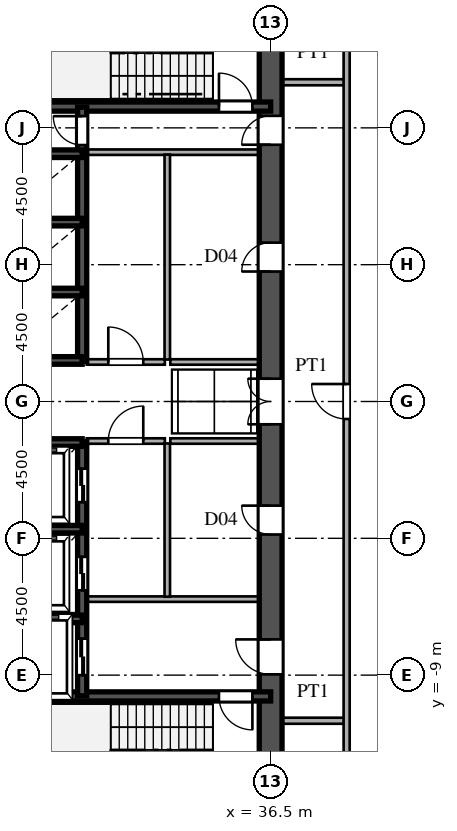
"""IFC4 building model, lengths in metres.
Left out: names, types, materials, properties, quantities, classifications, styles, units other than length and angle.
Written with IfcOpenShell. Run it as: python <this file> out.ifc"""

import sys

from ifc_helpers import new_model, si_unit, direction, frame, frame_2d, origin, place, context, subcontext, project, spatial, rectangle, extrude, source, transform, mapped, element, fill, save


model = new_model("IFC4")
c1 = context("Model", 3, precision=1e-05, world=origin(), true_north=direction((0.0, 1.0)))
c2 = subcontext(c1, "Body", "Model", "MODEL_VIEW")
j1 = project(units=[si_unit("LENGTHUNIT", "METRE"), si_unit("PLANEANGLEUNIT", "RADIAN")], contexts=[c1])
p1 = place(None, origin())
s1 = spatial("IfcSite", under=j1, at=p1, CompositionType="ELEMENT")
p2 = place(p1, origin())
s2 = spatial("IfcBuilding", under=s1, at=p2, CompositionType="ELEMENT")
p3 = place(p2, frame((0.0, 0.0, 14.4)))
s3 = spatial("IfcBuildingStorey", under=s2, at=p3, CompositionType="ELEMENT", Elevation=14.4)
p4 = place(p3, frame((30.537, -26.985, 0.0), z_axis=(0.0, 0.0, 1.0), x_axis=(0.926944846568, 0.375197616492, 0.0)))
e1 = element("IfcWall", 1, at=p4, inside=s3, PredefinedType="SOLIDWALL", context=c2, shape_type="SweptSolid", body=[
    extrude(rectangle(XDim=45.23, YDim=0.32, at=frame_2d((22.615, 0.0))), origin(), (0.0, 0.0, 1.0), 4.28),
])
p5 = place(p4, frame((6.0, 0.0, 0.85)))
e2 = element("IfcOpeningElement", 2, at=p5, cuts=e1, PredefinedType="OPENING", context=c2, shape_type="SweptSolid", body=[
    extrude(rectangle(XDim=1.8, YDim=2.0, at=frame_2d((0.9, 1.0))), frame((0.0, 0.17, 0.0), z_axis=(0.0, -1.0, 0.0), x_axis=(1.0, 0.0, 0.0)), (0.0, 0.0, 1.0), 0.34),
])
p6 = place(p4, frame((36.23, 0.0, 0.85)))
e3 = element("IfcOpeningElement", 3, at=p6, cuts=e1, PredefinedType="OPENING", context=c2, shape_type="SweptSolid", body=[
    extrude(rectangle(XDim=1.8, YDim=2.0, at=frame_2d((0.9, 1.0))), frame((0.0, 0.17, 0.0), z_axis=(0.0, -1.0, 0.0), x_axis=(1.0, 0.0, 0.0)), (0.0, 0.0, 1.0), 0.34),
])
p7 = place(p3, frame((72.463, 10.015, 0.0), z_axis=(0.0, 0.0, 1.0), x_axis=(-0.926944846568, 0.375197616492, 0.0)))
e4 = element("IfcWall", 4, at=p7, inside=s3, PredefinedType="SOLIDWALL", context=c2, shape_type="SweptSolid", body=[
    extrude(rectangle(XDim=45.23, YDim=0.32, at=frame_2d((22.615, 0.0))), origin(), (0.0, 0.0, 1.0), 4.28),
])
p8 = place(p7, frame((6.0, 0.0, 0.85)))
e5 = element("IfcOpeningElement", 5, at=p8, cuts=e4, PredefinedType="OPENING", context=c2, shape_type="SweptSolid", body=[
    extrude(rectangle(XDim=1.8, YDim=2.0, at=frame_2d((0.9, 1.0))), frame((0.0, 0.17, 0.0), z_axis=(0.0, -1.0, 0.0), x_axis=(1.0, 0.0, 0.0)), (0.0, 0.0, 1.0), 0.34),
])
p9 = place(p7, frame((36.23, 0.0, 0.85)))
e6 = element("IfcOpeningElement", 6, at=p9, cuts=e4, PredefinedType="OPENING", context=c2, shape_type="SweptSolid", body=[
    extrude(rectangle(XDim=1.8, YDim=2.0, at=frame_2d((0.9, 1.0))), frame((0.0, 0.17, 0.0), z_axis=(0.0, -1.0, 0.0), x_axis=(1.0, 0.0, 0.0)), (0.0, 0.0, 1.0), 0.34),
])
p10 = place(p3, frame((36.5, -13.65, 0.0), z_axis=(0.0, 0.0, 1.0), x_axis=(0.0, 1.0, 0.0)))
e7 = element("IfcWall", 7, at=p10, inside=s3, PredefinedType="SHEAR", context=c2, shape_type="SweptSolid", body=[
    extrude(rectangle(XDim=7.15, YDim=0.75, at=frame_2d((3.575, 0.0))), origin(), (0.0, 0.0, 1.0), 4.28),
])
p11 = place(p10, frame((4.675, 0.0, 0.0)))
e8 = element("IfcOpeningElement", 8, at=p11, cuts=e7, PredefinedType="OPENING", context=c2, shape_type="SweptSolid", body=[
    extrude(rectangle(XDim=1.15, YDim=2.2, at=frame_2d((0.575, 1.1))), frame((0.0, 0.385, 0.0), z_axis=(0.0, -1.0, 0.0), x_axis=(1.0, 0.0, 0.0)), (0.0, 0.0, 1.0), 0.77),
])
p12 = place(p3, frame((36.5, -1.3, 0.0), z_axis=(0.0, 0.0, 1.0), x_axis=(0.0, 1.0, 0.0)))
e9 = element("IfcWall", 9, at=p12, inside=s3, PredefinedType="SHEAR", context=c2, shape_type="SweptSolid", body=[
    extrude(rectangle(XDim=2.6, YDim=0.75, at=frame_2d((1.3, 0.0))), origin(), (0.0, 0.0, 1.0), 4.28),
])
p13 = place(p12, frame((0.55, 0.0, 0.0)))
e10 = element("IfcOpeningElement", 10, at=p13, cuts=e9, PredefinedType="OPENING", context=c2, shape_type="SweptSolid", body=[
    extrude(rectangle(XDim=1.5, YDim=2.3, at=frame_2d((0.75, 1.15))), frame((0.0, 0.385, 0.0), z_axis=(0.0, -1.0, 0.0), x_axis=(1.0, 0.0, 0.0)), (0.0, 0.0, 1.0), 0.77),
])
p14 = place(p3, frame((36.5, 8.2, 0.0), z_axis=(0.0, 0.0, 1.0), x_axis=(0.0, 1.0, 0.0)))
e11 = element("IfcWall", 11, at=p14, inside=s3, PredefinedType="SHEAR", context=c2, shape_type="SweptSolid", body=[
    extrude(rectangle(XDim=5.45, YDim=0.75, at=frame_2d((2.725, 0.0))), origin(), (0.0, 0.0, 1.0), 4.28),
])
p15 = place(p14, frame((0.245, 0.0, 0.0)))
e12 = element("IfcOpeningElement", 12, at=p15, cuts=e11, PredefinedType="OPENING", context=c2, shape_type="SweptSolid", body=[
    extrude(rectangle(XDim=0.95, YDim=2.15, at=frame_2d((0.475, 1.075))), frame((0.0, 0.385, 0.0), z_axis=(0.0, -1.0, 0.0), x_axis=(1.0, 0.0, 0.0)), (0.0, 0.0, 1.0), 0.77),
])
p16 = place(p3, frame((36.5, -6.5, 0.0), z_axis=(0.0, 0.0, 1.0), x_axis=(0.0, 1.0, 0.0)))
e13 = element("IfcWall", 13, at=p16, inside=s3, PredefinedType="SHEAR", context=c2, shape_type="SweptSolid", body=[
    extrude(rectangle(XDim=5.2, YDim=0.75, at=frame_2d((2.6, 0.0))), origin(), (0.0, 0.0, 1.0), 4.28),
])
p17 = place(p16, frame((2.125, 0.0, 0.0)))
e14 = element("IfcOpeningElement", 14, at=p17, cuts=e13, PredefinedType="OPENING", context=c2, shape_type="SweptSolid", body=[
    extrude(rectangle(XDim=0.95, YDim=2.15, at=frame_2d((0.475, 1.075))), frame((0.0, 0.385, 0.0), z_axis=(0.0, -1.0, 0.0), x_axis=(1.0, 0.0, 0.0)), (0.0, 0.0, 1.0), 0.77),
])
p18 = place(p3, frame((36.5, 1.3, 0.0), z_axis=(0.0, 0.0, 1.0), x_axis=(0.0, 1.0, 0.0)))
e15 = element("IfcWall", 15, at=p18, inside=s3, PredefinedType="SHEAR", context=c2, shape_type="SweptSolid", body=[
    extrude(rectangle(XDim=6.9, YDim=0.75, at=frame_2d((3.45, 0.0))), origin(), (0.0, 0.0, 1.0), 4.28),
])
p19 = place(p18, frame((2.975, 0.0, 0.0)))
e16 = element("IfcOpeningElement", 16, at=p19, cuts=e15, PredefinedType="OPENING", context=c2, shape_type="SweptSolid", body=[
    extrude(rectangle(XDim=0.95, YDim=2.15, at=frame_2d((0.475, 1.075))), frame((0.0, 0.385, 0.0), z_axis=(0.0, -1.0, 0.0), x_axis=(1.0, 0.0, 0.0)), (0.0, 0.0, 1.0), 0.77),
])
p20 = place(p3, frame((27.5, -9.7, 0.0), z_axis=(0.0, 0.0, 1.0), x_axis=(1.0, 0.0, 0.0)))
e17 = element("IfcWall", 17, at=p20, inside=s3, PredefinedType="SHEAR", context=c2, shape_type="SweptSolid", body=[
    extrude(rectangle(XDim=9.0, YDim=0.3, at=frame_2d((4.5, 0.0))), origin(), (0.0, 0.0, 1.0), 4.28),
])
p21 = place(p20, frame((7.3, 0.0, 0.0)))
e18 = element("IfcOpeningElement", 18, at=p21, cuts=e17, PredefinedType="OPENING", context=c2, shape_type="SweptSolid", body=[
    extrude(rectangle(XDim=1.1, YDim=2.2, at=frame_2d((0.55, 1.1))), frame((0.0, 0.16, 0.0), z_axis=(0.0, -1.0, 0.0), x_axis=(1.0, 0.0, 0.0)), (0.0, 0.0, 1.0), 0.32),
])
p22 = place(p3, frame((27.5, 9.7, 0.0), z_axis=(0.0, 0.0, 1.0), x_axis=(1.0, 0.0, 0.0)))
e19 = element("IfcWall", 19, at=p22, inside=s3, PredefinedType="SHEAR", context=c2, shape_type="SweptSolid", body=[
    extrude(rectangle(XDim=9.0, YDim=0.3, at=frame_2d((4.5, 0.0))), origin(), (0.0, 0.0, 1.0), 4.28),
])
p23 = place(p22, frame((7.3, 0.0, 0.0)))
e20 = element("IfcOpeningElement", 20, at=p23, cuts=e19, PredefinedType="OPENING", context=c2, shape_type="SweptSolid", body=[
    extrude(rectangle(XDim=1.1, YDim=2.2, at=frame_2d((0.55, 1.1))), frame((0.0, 0.16, 0.0), z_axis=(0.0, -1.0, 0.0), x_axis=(1.0, 0.0, 0.0)), (0.0, 0.0, 1.0), 0.32),
])
for number, where, z_axis, x_axis in (
    (21, (27.5, -7.15, 0.0), (0.0, 0.0, 1.0), (1.0, 0.0, 0.0)),
    (22, (27.5, -4.2, 0.0), (0.0, 0.0, 1.0), (1.0, 0.0, 0.0)),
    (23, (27.5, -1.35, 0.0), (0.0, 0.0, 1.0), (1.0, 0.0, 0.0)),
    (24, (27.5, 1.35, 0.0), (0.0, 0.0, 1.0), (1.0, 0.0, 0.0)),
    (25, (27.5, 3.6, 0.0), (0.0, 0.0, 1.0), (1.0, 0.0, 0.0)),
    (26, (27.5, 5.9, 0.0), (0.0, 0.0, 1.0), (1.0, 0.0, 0.0)),
    (27, (27.5, 8.15, 0.0), (0.0, 0.0, 1.0), (1.0, 0.0, 0.0)),
):
    element("IfcWall", number, at=place(p3, frame(where, z_axis=z_axis, x_axis=x_axis)), inside=s3, PredefinedType="SHEAR", context=c2, shape_type="SweptSolid", body=[
        extrude(rectangle(XDim=2.8, YDim=0.25, at=frame_2d((1.4, 0.0))), origin(), (0.0, 0.0, 1.0), 4.28),
    ])
p24 = place(p3, frame((30.3, -9.68, 0.0), z_axis=(0.0, 0.0, 1.0), x_axis=(0.0, 1.0, 0.0)))
e28 = element("IfcWall", 28, at=p24, inside=s3, PredefinedType="SHEAR", context=c2, shape_type="SweptSolid", body=[
    extrude(rectangle(XDim=2.56, YDim=0.3, at=frame_2d((1.28, 0.0))), origin(), (0.0, 0.0, 1.0), 4.28),
])
p25 = place(p24, frame((0.68, 0.0, 0.0)))
e29 = element("IfcOpeningElement", 29, at=p25, cuts=e28, PredefinedType="OPENING", context=c2, shape_type="SweptSolid", body=[
    extrude(rectangle(XDim=1.2, YDim=2.25, at=frame_2d((0.6, 1.125))), frame((0.0, 0.16, 0.0), z_axis=(0.0, -1.0, 0.0), x_axis=(1.0, 0.0, 0.0)), (0.0, 0.0, 1.0), 0.32),
])
p26 = place(p3, frame((30.3, -7.12, 0.0), z_axis=(0.0, 0.0, 1.0), x_axis=(0.0, 1.0, 0.0)))
e30 = element("IfcWall", 30, at=p26, inside=s3, PredefinedType="SHEAR", context=c2, shape_type="SweptSolid", body=[
    extrude(rectangle(XDim=2.92, YDim=0.3, at=frame_2d((1.46, 0.0))), origin(), (0.0, 0.0, 1.0), 4.28),
])
p27 = place(p26, frame((0.91, 0.0, 0.0)))
e31 = element("IfcOpeningElement", 31, at=p27, cuts=e30, PredefinedType="OPENING", context=c2, shape_type="SweptSolid", body=[
    extrude(rectangle(XDim=1.1, YDim=2.2, at=frame_2d((0.55, 1.1))), frame((0.0, 0.16, 0.0), z_axis=(0.0, -1.0, 0.0), x_axis=(1.0, 0.0, 0.0)), (0.0, 0.0, 1.0), 0.32),
])
p28 = place(p3, frame((30.3, -4.2, 0.0), z_axis=(0.0, 0.0, 1.0), x_axis=(0.0, 1.0, 0.0)))
e32 = element("IfcWall", 32, at=p28, inside=s3, PredefinedType="SHEAR", context=c2, shape_type="SweptSolid", body=[
    extrude(rectangle(XDim=2.88, YDim=0.3, at=frame_2d((1.44, 0.0))), origin(), (0.0, 0.0, 1.0), 4.28),
])
p29 = place(p28, frame((0.89, 0.0, 0.0)))
e33 = element("IfcOpeningElement", 33, at=p29, cuts=e32, PredefinedType="OPENING", context=c2, shape_type="SweptSolid", body=[
    extrude(rectangle(XDim=1.1, YDim=2.2, at=frame_2d((0.55, 1.1))), frame((0.0, 0.16, 0.0), z_axis=(0.0, -1.0, 0.0), x_axis=(1.0, 0.0, 0.0)), (0.0, 0.0, 1.0), 0.32),
])
p30 = place(p3, frame((30.3, 1.32, 0.0), z_axis=(0.0, 0.0, 1.0), x_axis=(0.0, 1.0, 0.0)))
e34 = element("IfcWall", 34, at=p30, inside=s3, PredefinedType="SHEAR", context=c2, shape_type="SweptSolid", body=[
    extrude(rectangle(XDim=2.28, YDim=0.3, at=frame_2d((1.14, 0.0))), origin(), (0.0, 0.0, 1.0), 4.28),
])
p31 = place(p3, frame((30.3, 3.6, 0.0), z_axis=(0.0, 0.0, 1.0), x_axis=(0.0, 1.0, 0.0)))
e35 = element("IfcWall", 35, at=p31, inside=s3, PredefinedType="SHEAR", context=c2, shape_type="SweptSolid", body=[
    extrude(rectangle(XDim=2.3, YDim=0.3, at=frame_2d((1.15, 0.0))), origin(), (0.0, 0.0, 1.0), 4.28),
])
p32 = place(p3, frame((30.3, 5.9, 0.0), z_axis=(0.0, 0.0, 1.0), x_axis=(0.0, 1.0, 0.0)))
e36 = element("IfcWall", 36, at=p32, inside=s3, PredefinedType="SHEAR", context=c2, shape_type="SweptSolid", body=[
    extrude(rectangle(XDim=2.25, YDim=0.3, at=frame_2d((1.125, 0.0))), origin(), (0.0, 0.0, 1.0), 4.28),
])
p33 = place(p3, frame((30.3, 8.15, 0.0), z_axis=(0.0, 0.0, 1.0), x_axis=(0.0, 1.0, 0.0)))
e37 = element("IfcWall", 37, at=p33, inside=s3, PredefinedType="SHEAR", context=c2, shape_type="SweptSolid", body=[
    extrude(rectangle(XDim=1.53, YDim=0.3, at=frame_2d((0.765, 0.0))), origin(), (0.0, 0.0, 1.0), 4.28),
])
p34 = place(p33, frame((0.285, 0.0, 0.0)))
e38 = element("IfcOpeningElement", 38, at=p34, cuts=e37, PredefinedType="OPENING", context=c2, shape_type="SweptSolid", body=[
    extrude(rectangle(XDim=0.95, YDim=2.15, at=frame_2d((0.475, 1.075))), frame((0.0, 0.16, 0.0), z_axis=(0.0, -1.0, 0.0), x_axis=(1.0, 0.0, 0.0)), (0.0, 0.0, 1.0), 0.32),
])
for number, where, z_axis, x_axis in (
    (39, (30.45, -6.5, 0.0), (0.0, 0.0, 1.0), (1.0, 0.0, 0.0)),
    (40, (30.45, 8.2, 0.0), (0.0, 0.0, 1.0), (1.0, 0.0, 0.0)),
):
    element("IfcWall", number, at=place(p3, frame(where, z_axis=z_axis, x_axis=x_axis)), inside=s3, PredefinedType="PARTITIONING", context=c2, shape_type="SweptSolid", body=[
        extrude(rectangle(XDim=5.7, YDim=0.18, at=frame_2d((2.85, 0.0))), origin(), (0.0, 0.0, 1.0), 4.28),
    ])
p35 = place(p3, frame((33.1, -6.42, 0.0), z_axis=(0.0, 0.0, 1.0), x_axis=(0.0, 1.0, 0.0)))
e41 = element("IfcWall", 41, at=p35, inside=s3, PredefinedType="PARTITIONING", context=c2, shape_type="SweptSolid", body=[
    extrude(rectangle(XDim=5.04, YDim=0.18, at=frame_2d((2.52, 0.0))), origin(), (0.0, 0.0, 1.0), 4.28),
])
p36 = place(p3, frame((33.1, 1.38, 0.0), z_axis=(0.0, 0.0, 1.0), x_axis=(0.0, 1.0, 0.0)))
e42 = element("IfcWall", 42, at=p36, inside=s3, PredefinedType="PARTITIONING", context=c2, shape_type="SweptSolid", body=[
    extrude(rectangle(XDim=6.74, YDim=0.18, at=frame_2d((3.37, 0.0))), origin(), (0.0, 0.0, 1.0), 4.28),
])
p37 = place(p3, frame((30.45, -1.3, 0.0), z_axis=(0.0, 0.0, 1.0), x_axis=(1.0, 0.0, 0.0)))
e43 = element("IfcWall", 43, at=p37, inside=s3, PredefinedType="PARTITIONING", context=c2, shape_type="SweptSolid", body=[
    extrude(rectangle(XDim=2.57, YDim=0.18, at=frame_2d((1.285, 0.0))), origin(), (0.0, 0.0, 1.0), 4.28),
])
p38 = place(p37, frame((0.71, 0.0, 0.0)))
e44 = element("IfcOpeningElement", 44, at=p38, cuts=e43, PredefinedType="OPENING", context=c2, shape_type="SweptSolid", body=[
    extrude(rectangle(XDim=1.15, YDim=2.2, at=frame_2d((0.575, 1.1))), frame((0.0, 0.1, 0.0), z_axis=(0.0, -1.0, 0.0), x_axis=(1.0, 0.0, 0.0)), (0.0, 0.0, 1.0), 0.2),
])
p39 = place(p3, frame((30.45, 1.3, 0.0), z_axis=(0.0, 0.0, 1.0), x_axis=(1.0, 0.0, 0.0)))
e45 = element("IfcWall", 45, at=p39, inside=s3, PredefinedType="PARTITIONING", context=c2, shape_type="SweptSolid", body=[
    extrude(rectangle(XDim=2.57, YDim=0.18, at=frame_2d((1.285, 0.0))), origin(), (0.0, 0.0, 1.0), 4.28),
])
p40 = place(p39, frame((0.71, 0.0, 0.0)))
e46 = element("IfcOpeningElement", 46, at=p40, cuts=e45, PredefinedType="OPENING", context=c2, shape_type="SweptSolid", body=[
    extrude(rectangle(XDim=1.15, YDim=2.2, at=frame_2d((0.575, 1.1))), frame((0.0, 0.1, 0.0), z_axis=(0.0, -1.0, 0.0), x_axis=(1.0, 0.0, 0.0)), (0.0, 0.0, 1.0), 0.2),
])
for number, where, z_axis, x_axis in (
    (47, (33.2, -1.3, 0.0), (0.0, 0.0, 1.0), (1.0, 0.0, 0.0)),
    (48, (33.2, 1.3, 0.0), (0.0, 0.0, 1.0), (1.0, 0.0, 0.0)),
):
    element("IfcWall", number, at=place(p3, frame(where, z_axis=z_axis, x_axis=x_axis)), inside=s3, PredefinedType="PARTITIONING", context=c2, shape_type="SweptSolid", body=[
        extrude(rectangle(XDim=2.95, YDim=0.18, at=frame_2d((1.475, 0.0))), origin(), (0.0, 0.0, 1.0), 4.28),
    ])
for number, where, z_axis, x_axis in (
    (49, (36.88, -10.5, 0.0), (0.0, 0.0, 1.0), (1.0, 0.0, 0.0)),
    (50, (36.88, 10.5, 0.0), (0.0, 0.0, 1.0), (1.0, 0.0, 0.0)),
):
    element("IfcWall", number, at=place(p3, frame(where, z_axis=z_axis, x_axis=x_axis)), inside=s3, PredefinedType="PARTITIONING", context=c2, shape_type="SweptSolid", body=[
        extrude(rectangle(XDim=2.035, YDim=0.2, at=frame_2d((1.018, 0.0))), origin(), (0.0, 0.0, 1.0), 4.28),
    ])
p41 = place(p3, frame((39.0, -18.0, 0.0), z_axis=(0.0, 0.0, 1.0), x_axis=(0.0, 1.0, 0.0)))
e51 = element("IfcWall", 51, at=p41, inside=s3, PredefinedType="PARTITIONING", context=c2, shape_type="SweptSolid", body=[
    extrude(rectangle(XDim=36.0, YDim=0.2, at=frame_2d((18.0, 0.0))), origin(), (0.0, 0.0, 1.0), 4.28),
])
p42 = place(p41, frame((17.425, 0.0, 0.0)))
e52 = element("IfcOpeningElement", 52, at=p42, cuts=e51, PredefinedType="OPENING", context=c2, shape_type="SweptSolid", body=[
    extrude(rectangle(XDim=1.15, YDim=2.2, at=frame_2d((0.575, 1.1))), frame((0.0, 0.11, 0.0), z_axis=(0.0, -1.0, 0.0), x_axis=(1.0, 0.0, 0.0)), (0.0, 0.0, 1.0), 0.22),
])
m1 = source(origin(), c2, "Body", "SweptSolid", [
    extrude(rectangle(XDim=1.15, YDim=2.2, at=frame_2d((0.575, 1.1))), frame((0.0, 0.025, 0.0), z_axis=(0.0, -1.0, 0.0), x_axis=(1.0, 0.0, 0.0)), (0.0, 0.0, 1.0), 0.05),
])
p43 = place(p11, origin())
e53 = element("IfcDoor", 53, at=p43, inside=s3, OperationType="SINGLE_SWING_RIGHT", PredefinedType="DOOR", context=c2, shape_type="MappedRepresentation", body=[
    mapped(m1, transform((0.0, 0.0, 0.0), scale=1.0)),
])
fill(e8, e53)
m2 = source(origin(), c2, "Body", "SweptSolid", [
    extrude(rectangle(XDim=1.5, YDim=2.3, at=frame_2d((0.75, 1.15))), frame((0.0, 0.025, 0.0), z_axis=(0.0, -1.0, 0.0), x_axis=(1.0, 0.0, 0.0)), (0.0, 0.0, 1.0), 0.05),
])
p44 = place(p13, origin())
e54 = element("IfcDoor", 54, at=p44, inside=s3, OperationType="DOUBLE_SWING_LEFT", PredefinedType="DOOR", context=c2, shape_type="MappedRepresentation", body=[
    mapped(m2, transform((0.0, 0.0, 0.0), scale=1.0)),
])
fill(e10, e54)
m3 = source(origin(), c2, "Body", "SweptSolid", [
    extrude(rectangle(XDim=0.95, YDim=2.15, at=frame_2d((0.475, 1.075))), frame((0.0, 0.025, 0.0), z_axis=(0.0, -1.0, 0.0), x_axis=(1.0, 0.0, 0.0)), (0.0, 0.0, 1.0), 0.05),
])
p45 = place(p15, origin())
e55 = element("IfcDoor", 55, at=p45, inside=s3, OperationType="SINGLE_SWING_LEFT", PredefinedType="DOOR", context=c2, shape_type="MappedRepresentation", body=[
    mapped(m3, transform((0.0, 0.0, 0.0), scale=1.0)),
])
fill(e12, e55)
p46 = place(p17, origin())
e56 = element("IfcDoor", 56, at=p46, inside=s3, OperationType="SINGLE_SWING_RIGHT", PredefinedType="DOOR", context=c2, shape_type="MappedRepresentation", body=[
    mapped(m3, transform((0.0, 0.0, 0.0), scale=1.0)),
])
fill(e14, e56)
p47 = place(p19, origin())
e57 = element("IfcDoor", 57, at=p47, inside=s3, OperationType="SINGLE_SWING_LEFT", PredefinedType="DOOR", context=c2, shape_type="MappedRepresentation", body=[
    mapped(m3, transform((0.0, 0.0, 0.0), scale=1.0)),
])
fill(e16, e57)
m4 = source(origin(), c2, "Body", "SweptSolid", [
    extrude(rectangle(XDim=1.1, YDim=2.2, at=frame_2d((0.55, 1.1))), frame((0.0, 0.025, 0.0), z_axis=(0.0, -1.0, 0.0), x_axis=(1.0, 0.0, 0.0)), (0.0, 0.0, 1.0), 0.05),
])
p48 = place(p21, frame((1.1, 0.0, 0.0), z_axis=(0.0, 0.0, 1.0), x_axis=(-1.0, 0.0, 0.0)))
e58 = element("IfcDoor", 58, at=p48, inside=s3, OperationType="SINGLE_SWING_RIGHT", PredefinedType="DOOR", context=c2, shape_type="MappedRepresentation", body=[
    mapped(m4, transform((0.0, 0.0, 0.0), scale=1.0)),
])
fill(e18, e58)
p49 = place(p23, origin())
e59 = element("IfcDoor", 59, at=p49, inside=s3, OperationType="SINGLE_SWING_LEFT", PredefinedType="DOOR", context=c2, shape_type="MappedRepresentation", body=[
    mapped(m4, transform((0.0, 0.0, 0.0), scale=1.0)),
])
fill(e20, e59)
m5 = source(origin(), c2, "Body", "SweptSolid", [
    extrude(rectangle(XDim=1.2, YDim=2.25, at=frame_2d((0.6, 1.125))), frame((0.0, 0.025, 0.0), z_axis=(0.0, -1.0, 0.0), x_axis=(1.0, 0.0, 0.0)), (0.0, 0.0, 1.0), 0.05),
])
p50 = place(p25, origin())
e60 = element("IfcDoor", 60, at=p50, inside=s3, OperationType="DOUBLE_DOOR_SLIDING", PredefinedType="DOOR", context=c2, shape_type="MappedRepresentation", body=[
    mapped(m5, transform((0.0, 0.0, 0.0), scale=1.0)),
])
fill(e29, e60)
m6 = source(origin(), c2, "Body", "SweptSolid", [
    extrude(rectangle(XDim=1.1, YDim=2.2, at=frame_2d((0.55, 1.1))), frame((0.0, 0.025, 0.0), z_axis=(0.0, -1.0, 0.0), x_axis=(1.0, 0.0, 0.0)), (0.0, 0.0, 1.0), 0.05),
])
p51 = place(p27, origin())
e61 = element("IfcDoor", 61, at=p51, inside=s3, OperationType="DOUBLE_DOOR_SLIDING", PredefinedType="DOOR", context=c2, shape_type="MappedRepresentation", body=[
    mapped(m6, transform((0.0, 0.0, 0.0), scale=1.0)),
])
fill(e31, e61)
p52 = place(p29, origin())
e62 = element("IfcDoor", 62, at=p52, inside=s3, OperationType="DOUBLE_DOOR_SLIDING", PredefinedType="DOOR", context=c2, shape_type="MappedRepresentation", body=[
    mapped(m6, transform((0.0, 0.0, 0.0), scale=1.0)),
])
fill(e33, e62)
p53 = place(p34, origin())
e63 = element("IfcDoor", 63, at=p53, inside=s3, OperationType="SINGLE_SWING_RIGHT", PredefinedType="DOOR", context=c2, shape_type="MappedRepresentation", body=[
    mapped(m3, transform((0.0, 0.0, 0.0), scale=1.0)),
])
fill(e38, e63)
p54 = place(p38, origin())
e64 = element("IfcDoor", 64, at=p54, inside=s3, OperationType="SINGLE_SWING_RIGHT", PredefinedType="DOOR", context=c2, shape_type="MappedRepresentation", body=[
    mapped(m1, transform((0.0, 0.0, 0.0), scale=1.0)),
])
fill(e44, e64)
p55 = place(p40, origin())
e65 = element("IfcDoor", 65, at=p55, inside=s3, OperationType="SINGLE_SWING_LEFT", PredefinedType="DOOR", context=c2, shape_type="MappedRepresentation", body=[
    mapped(m1, transform((0.0, 0.0, 0.0), scale=1.0)),
])
fill(e46, e65)
p56 = place(p42, origin())
e66 = element("IfcDoor", 66, at=p56, inside=s3, OperationType="SINGLE_SWING_RIGHT", PredefinedType="DOOR", context=c2, shape_type="MappedRepresentation", body=[
    mapped(m1, transform((0.0, 0.0, 0.0), scale=1.0)),
])
fill(e52, e66)
save(model, sys.argv[1])
